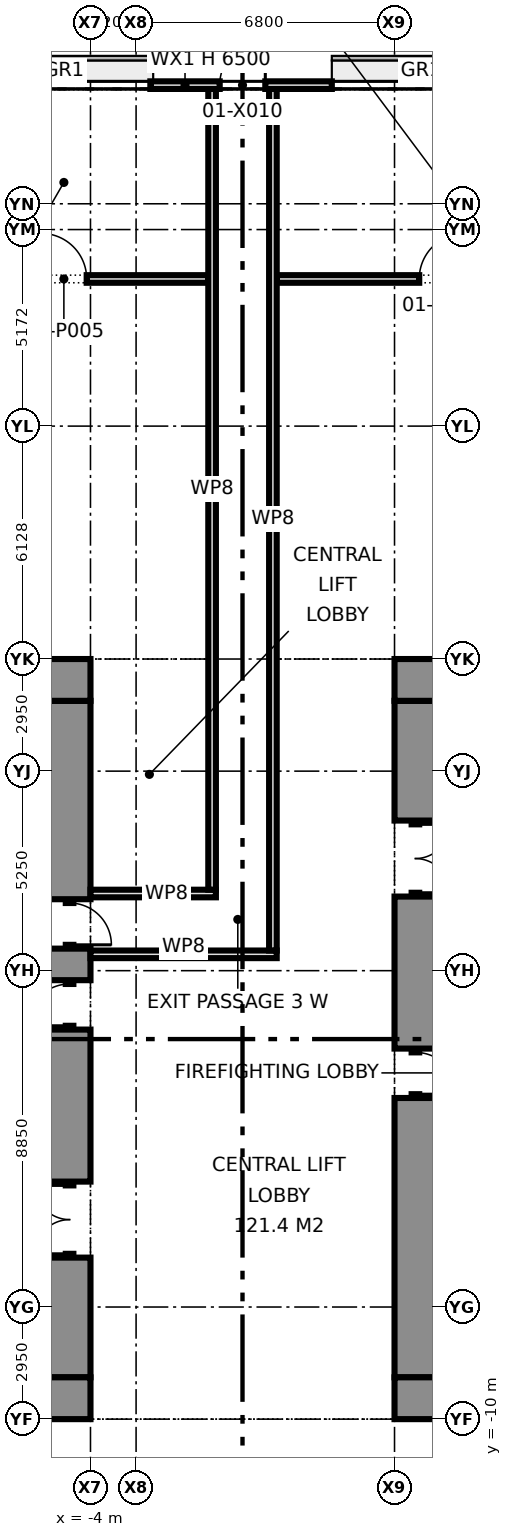
"""IFC4 building model, lengths in metres.
Left out: names, types, materials, properties, quantities, classifications, styles, units other than length and angle.
Written with IfcOpenShell. Run it as: python <this file> out.ifc"""

import sys

from ifc_helpers import new_model, si_unit, direction, frame, frame_2d, origin, place, context, subcontext, project, spatial, rectangle, extrude, element, fill, save


model = new_model("IFC4")
c1 = context("Model", 3, precision=1e-05, world=origin(), true_north=direction((0.0, 1.0)))
c2 = subcontext(c1, "Body", "Model", "MODEL_VIEW")
j1 = project(units=[si_unit("LENGTHUNIT", "METRE"), si_unit("PLANEANGLEUNIT", "RADIAN")], contexts=[c1])
p1 = place(None, origin())
s1 = spatial("IfcSite", under=j1, at=p1, CompositionType="ELEMENT")
p2 = place(p1, origin())
s2 = spatial("IfcBuilding", under=s1, at=p2, CompositionType="ELEMENT")
p3 = place(p2, origin())
s3 = spatial("IfcBuildingStorey", under=s2, at=p3, CompositionType="ELEMENT", Elevation=0.0)
p4 = place(p3, frame((2.35, 25.1, 0.0), z_axis=(0.0, 0.0, 1.0), x_axis=(-1.0, 0.0, 0.0)))
e1 = element("IfcWall", 1, at=p4, inside=s3, PredefinedType="STANDARD", context=c2, shape_type="SweptSolid", body=[
    extrude(rectangle(XDim=4.775, YDim=0.2, at=frame_2d((2.388, 0.0))), origin(), (0.0, 0.0, 1.0), 6.5),
])
p5 = place(p4, frame((1.75, 0.0, 0.0)))
e2 = element("IfcOpeningElement", 2, at=p5, cuts=e1, PredefinedType="OPENING", context=c2, shape_type="SweptSolid", body=[
    extrude(rectangle(XDim=1.2, YDim=2.1, at=frame_2d((0.6, 1.05))), frame((0.0, 0.11, 0.0), z_axis=(0.0, -1.0, 0.0), x_axis=(1.0, 0.0, 0.0)), (0.0, 0.0, 1.0), 0.22),
])
for number, where, z_axis, x_axis in (
    (3, (-15.0, -9.45, 0.0), (0.0, 0.0, 1.0), (1.0, 0.0, 0.0)),
    (4, (-15.0, 9.45, 0.0), (0.0, 0.0, 1.0), (1.0, 0.0, 0.0)),
):
    element("IfcWall", number, at=place(p3, frame(where, z_axis=z_axis, x_axis=x_axis)), inside=s3, PredefinedType="SHEAR", context=c2, shape_type="SweptSolid", body=[
        extrude(rectangle(XDim=11.0, YDim=1.1, at=frame_2d((5.5, 0.0))), origin(), (0.0, 0.0, 1.0), 6.275),
    ])
p6 = place(p3, frame((-4.55, -8.9, 0.0), z_axis=(0.0, 0.0, 1.0), x_axis=(0.0, 1.0, 0.0)))
e5 = element("IfcWall", 5, at=p6, inside=s3, PredefinedType="SHEAR", context=c2, shape_type="SweptSolid", body=[
    extrude(rectangle(XDim=3.15, YDim=1.1, at=frame_2d((1.575, 0.0))), origin(), (0.0, 0.0, 1.0), 6.275),
])
p7 = place(p3, frame((-4.55, -5.75, 0.0), z_axis=(0.0, 0.0, 1.0), x_axis=(0.0, 1.0, 0.0)))
e6 = element("IfcWall", 6, at=p7, inside=s3, PredefinedType="PARTITIONING", context=c2, shape_type="SweptSolid", body=[
    extrude(rectangle(XDim=2.0, YDim=0.2, at=frame_2d((1.0, 0.0))), origin(), (0.0, 0.0, 1.0), 2.4),
])
p8 = place(p7, frame((0.1, 0.0, 0.0)))
e7 = element("IfcOpeningElement", 7, at=p8, cuts=e6, PredefinedType="OPENING", context=c2, shape_type="SweptSolid", body=[
    extrude(rectangle(XDim=1.8, YDim=2.1, at=frame_2d((0.9, 1.05))), frame((0.0, 0.11, 0.0), z_axis=(0.0, -1.0, 0.0), x_axis=(1.0, 0.0, 0.0)), (0.0, 0.0, 1.0), 0.22),
])
p9 = place(p3, frame((-4.55, -3.75, 0.0), z_axis=(0.0, 0.0, 1.0), x_axis=(0.0, 1.0, 0.0)))
e8 = element("IfcWall", 8, at=p9, inside=s3, PredefinedType="SHEAR", context=c2, shape_type="SweptSolid", body=[
    extrude(rectangle(XDim=4.0, YDim=1.1, at=frame_2d((2.0, 0.0))), origin(), (0.0, 0.0, 1.0), 6.275),
])
p10 = place(p3, frame((-4.55, 0.25, 0.0), z_axis=(0.0, 0.0, 1.0), x_axis=(0.0, 1.0, 0.0)))
e9 = element("IfcWall", 9, at=p10, inside=s3, PredefinedType="PARTITIONING", context=c2, shape_type="SweptSolid", body=[
    extrude(rectangle(XDim=1.3, YDim=0.2, at=frame_2d((0.65, 0.0))), origin(), (0.0, 0.0, 1.0), 2.4),
])
p11 = place(p10, frame((0.1, 0.0, 0.0)))
e10 = element("IfcOpeningElement", 10, at=p11, cuts=e9, PredefinedType="OPENING", context=c2, shape_type="SweptSolid", body=[
    extrude(rectangle(XDim=1.1, YDim=2.1, at=frame_2d((0.55, 1.05))), frame((0.0, 0.11, 0.0), z_axis=(0.0, -1.0, 0.0), x_axis=(1.0, 0.0, 0.0)), (0.0, 0.0, 1.0), 0.22),
])
p12 = place(p3, frame((-4.55, 1.55, 0.0), z_axis=(0.0, 0.0, 1.0), x_axis=(0.0, 1.0, 0.0)))
e11 = element("IfcWall", 11, at=p12, inside=s3, PredefinedType="SHEAR", context=c2, shape_type="SweptSolid", body=[
    extrude(rectangle(XDim=0.83, YDim=1.1, at=frame_2d((0.415, 0.0))), origin(), (0.0, 0.0, 1.0), 6.275),
])
p13 = place(p3, frame((-4.55, 2.38, 0.0), z_axis=(0.0, 0.0, 1.0), x_axis=(0.0, 1.0, 0.0)))
e12 = element("IfcWall", 12, at=p13, inside=s3, PredefinedType="SHEAR", context=c2, shape_type="SweptSolid", body=[
    extrude(rectangle(XDim=1.3, YDim=0.2, at=frame_2d((0.65, 0.0))), origin(), (0.0, 0.0, 1.0), 2.4),
])
p14 = place(p13, frame((0.1, 0.0, 0.0)))
e13 = element("IfcOpeningElement", 13, at=p14, cuts=e12, PredefinedType="OPENING", context=c2, shape_type="SweptSolid", body=[
    extrude(rectangle(XDim=1.1, YDim=2.1, at=frame_2d((0.55, 1.05))), frame((0.0, 0.11, 0.0), z_axis=(0.0, -1.0, 0.0), x_axis=(1.0, 0.0, 0.0)), (0.0, 0.0, 1.0), 0.22),
])
p15 = place(p3, frame((-4.55, 3.68, 0.0), z_axis=(0.0, 0.0, 1.0), x_axis=(0.0, 1.0, 0.0)))
e14 = element("IfcWall", 14, at=p15, inside=s3, PredefinedType="SHEAR", context=c2, shape_type="SweptSolid", body=[
    extrude(rectangle(XDim=5.22, YDim=1.1, at=frame_2d((2.61, 0.0))), origin(), (0.0, 0.0, 1.0), 6.275),
])
for number, where, z_axis, x_axis in (
    (15, (15.0, 9.45, 0.0), (0.0, 0.0, 1.0), (-1.0, 0.0, 0.0)),
    (16, (15.0, -9.45, 0.0), (0.0, 0.0, 1.0), (-1.0, 0.0, 0.0)),
):
    element("IfcWall", number, at=place(p3, frame(where, z_axis=z_axis, x_axis=x_axis)), inside=s3, PredefinedType="SHEAR", context=c2, shape_type="SweptSolid", body=[
        extrude(rectangle(XDim=11.0, YDim=1.1, at=frame_2d((5.5, 0.0))), origin(), (0.0, 0.0, 1.0), 6.275),
    ])
p16 = place(p3, frame((4.55, 8.9, 0.0), z_axis=(0.0, 0.0, 1.0), x_axis=(0.0, -1.0, 0.0)))
e17 = element("IfcWall", 17, at=p16, inside=s3, PredefinedType="SHEAR", context=c2, shape_type="SweptSolid", body=[
    extrude(rectangle(XDim=3.15, YDim=1.1, at=frame_2d((1.575, 0.0))), origin(), (0.0, 0.0, 1.0), 6.275),
])
p17 = place(p3, frame((4.55, 5.75, 0.0), z_axis=(0.0, 0.0, 1.0), x_axis=(0.0, -1.0, 0.0)))
e18 = element("IfcWall", 18, at=p17, inside=s3, PredefinedType="PARTITIONING", context=c2, shape_type="SweptSolid", body=[
    extrude(rectangle(XDim=2.0, YDim=0.2, at=frame_2d((1.0, 0.0))), origin(), (0.0, 0.0, 1.0), 2.4),
])
p18 = place(p17, frame((0.1, 0.0, 0.0)))
e19 = element("IfcOpeningElement", 19, at=p18, cuts=e18, PredefinedType="OPENING", context=c2, shape_type="SweptSolid", body=[
    extrude(rectangle(XDim=1.8, YDim=2.1, at=frame_2d((0.9, 1.05))), frame((0.0, 0.11, 0.0), z_axis=(0.0, -1.0, 0.0), x_axis=(1.0, 0.0, 0.0)), (0.0, 0.0, 1.0), 0.22),
])
p19 = place(p3, frame((4.55, 3.75, 0.0), z_axis=(0.0, 0.0, 1.0), x_axis=(0.0, -1.0, 0.0)))
e20 = element("IfcWall", 20, at=p19, inside=s3, PredefinedType="SHEAR", context=c2, shape_type="SweptSolid", body=[
    extrude(rectangle(XDim=4.0, YDim=1.1, at=frame_2d((2.0, 0.0))), origin(), (0.0, 0.0, 1.0), 6.275),
])
p20 = place(p3, frame((4.55, -0.25, 0.0), z_axis=(0.0, 0.0, 1.0), x_axis=(0.0, -1.0, 0.0)))
e21 = element("IfcWall", 21, at=p20, inside=s3, PredefinedType="PARTITIONING", context=c2, shape_type="SweptSolid", body=[
    extrude(rectangle(XDim=1.3, YDim=0.2, at=frame_2d((0.65, 0.0))), origin(), (0.0, 0.0, 1.0), 2.4),
])
p21 = place(p20, frame((0.1, 0.0, 0.0)))
e22 = element("IfcOpeningElement", 22, at=p21, cuts=e21, PredefinedType="OPENING", context=c2, shape_type="SweptSolid", body=[
    extrude(rectangle(XDim=1.1, YDim=2.1, at=frame_2d((0.55, 1.05))), frame((0.0, 0.11, 0.0), z_axis=(0.0, -1.0, 0.0), x_axis=(1.0, 0.0, 0.0)), (0.0, 0.0, 1.0), 0.22),
])
p22 = place(p3, frame((4.55, -1.55, 0.0), z_axis=(0.0, 0.0, 1.0), x_axis=(0.0, -1.0, 0.0)))
e23 = element("IfcWall", 23, at=p22, inside=s3, PredefinedType="SHEAR", context=c2, shape_type="SweptSolid", body=[
    extrude(rectangle(XDim=7.35, YDim=1.1, at=frame_2d((3.675, 0.0))), origin(), (0.0, 0.0, 1.0), 6.275),
])
p23 = place(p3, frame((-8.7, 20.0, 0.0), z_axis=(0.0, 0.0, 1.0), x_axis=(1.0, 0.0, 0.0)))
e24 = element("IfcWall", 24, at=p23, inside=s3, PredefinedType="PARTITIONING", context=c2, shape_type="SweptSolid", body=[
    extrude(rectangle(XDim=7.8, YDim=0.2, at=frame_2d((3.9, 0.0))), origin(), (0.0, 0.0, 1.0), 6.275),
])
p24 = place(p23, frame((3.4, 0.0, 0.0)))
e25 = element("IfcOpeningElement", 25, at=p24, cuts=e24, PredefinedType="OPENING", context=c2, shape_type="SweptSolid", body=[
    extrude(rectangle(XDim=1.2, YDim=2.1, at=frame_2d((0.6, 1.05))), frame((0.0, 0.11, 0.0), z_axis=(0.0, -1.0, 0.0), x_axis=(1.0, 0.0, 0.0)), (0.0, 0.0, 1.0), 0.22),
])
p25 = place(p3, frame((0.9, 20.0, 0.0), z_axis=(0.0, 0.0, 1.0), x_axis=(1.0, 0.0, 0.0)))
e26 = element("IfcWall", 26, at=p25, inside=s3, PredefinedType="PARTITIONING", context=c2, shape_type="SweptSolid", body=[
    extrude(rectangle(XDim=8.9, YDim=0.2, at=frame_2d((4.45, 0.0))), origin(), (0.0, 0.0, 1.0), 6.275),
])
p26 = place(p25, frame((3.75, 0.0, 0.0)))
e27 = element("IfcOpeningElement", 27, at=p26, cuts=e26, PredefinedType="OPENING", context=c2, shape_type="SweptSolid", body=[
    extrude(rectangle(XDim=1.2, YDim=2.1, at=frame_2d((0.6, 1.05))), frame((0.0, 0.11, 0.0), z_axis=(0.0, -1.0, 0.0), x_axis=(1.0, 0.0, 0.0)), (0.0, 0.0, 1.0), 0.22),
])
p27 = place(p3, frame((-4.0, 2.23, 0.0), z_axis=(0.0, 0.0, 1.0), x_axis=(1.0, 0.0, 0.0)))
e28 = element("IfcWall", 28, at=p27, inside=s3, PredefinedType="PARTITIONING", context=c2, shape_type="SweptSolid", body=[
    extrude(rectangle(XDim=4.9, YDim=0.2, at=frame_2d((2.45, 0.0))), origin(), (0.0, 0.0, 1.0), 6.275),
])
p28 = place(p3, frame((-4.0, 3.83, 0.0), z_axis=(0.0, 0.0, 1.0), x_axis=(1.0, 0.0, 0.0)))
e29 = element("IfcWall", 29, at=p28, inside=s3, PredefinedType="PARTITIONING", context=c2, shape_type="SweptSolid", body=[
    extrude(rectangle(XDim=3.3, YDim=0.2, at=frame_2d((1.65, 0.0))), origin(), (0.0, 0.0, 1.0), 6.275),
])
p29 = place(p3, frame((0.8, 2.33, 0.0), z_axis=(0.0, 0.0, 1.0), x_axis=(0.0, 1.0, 0.0)))
e30 = element("IfcWall", 30, at=p29, inside=s3, PredefinedType="PARTITIONING", context=c2, shape_type="SweptSolid", body=[
    extrude(rectangle(XDim=22.7, YDim=0.2, at=frame_2d((11.35, 0.0))), origin(), (0.0, 0.0, 1.0), 6.275),
])
p30 = place(p3, frame((-0.8, 3.93, 0.0), z_axis=(0.0, 0.0, 1.0), x_axis=(0.0, 1.0, 0.0)))
e31 = element("IfcWall", 31, at=p30, inside=s3, PredefinedType="PARTITIONING", context=c2, shape_type="SweptSolid", body=[
    extrude(rectangle(XDim=21.1, YDim=0.2, at=frame_2d((10.55, 0.0))), origin(), (0.0, 0.0, 1.0), 6.275),
])
p31 = place(p5, frame((1.2, 0.0, 0.0), z_axis=(0.0, 0.0, 1.0), x_axis=(-1.0, 0.0, 0.0)))
e32 = element("IfcDoor", 32, at=p31, inside=s3, OperationType="SINGLE_SWING_RIGHT", PredefinedType="DOOR", context=c2, shape_type="SweptSolid", body=[
    extrude(rectangle(XDim=1.2, YDim=2.1, at=frame_2d((0.6, 1.05))), frame((0.0, 0.025, 0.0), z_axis=(0.0, -1.0, 0.0), x_axis=(1.0, 0.0, 0.0)), (0.0, 0.0, 1.0), 0.05),
])
fill(e2, e32)
p32 = place(p8, origin())
e33 = element("IfcDoor", 33, at=p32, inside=s3, OperationType="DOUBLE_DOOR_SINGLE_SWING", PredefinedType="DOOR", context=c2, shape_type="SweptSolid", body=[
    extrude(rectangle(XDim=1.8, YDim=2.1, at=frame_2d((0.9, 1.05))), frame((0.0, 0.025, 0.0), z_axis=(0.0, -1.0, 0.0), x_axis=(1.0, 0.0, 0.0)), (0.0, 0.0, 1.0), 0.05),
])
fill(e7, e33)
p33 = place(p11, origin())
e34 = element("IfcDoor", 34, at=p33, inside=s3, OperationType="SINGLE_SWING_LEFT", PredefinedType="DOOR", context=c2, shape_type="SweptSolid", body=[
    extrude(rectangle(XDim=1.1, YDim=2.1, at=frame_2d((0.55, 1.05))), frame((0.0, 0.025, 0.0), z_axis=(0.0, -1.0, 0.0), x_axis=(1.0, 0.0, 0.0)), (0.0, 0.0, 1.0), 0.05),
])
fill(e10, e34)
p34 = place(p14, frame((1.1, 0.0, 0.0), z_axis=(0.0, 0.0, 1.0), x_axis=(-1.0, 0.0, 0.0)))
e35 = element("IfcDoor", 35, at=p34, inside=s3, OperationType="SINGLE_SWING_RIGHT", PredefinedType="DOOR", context=c2, shape_type="SweptSolid", body=[
    extrude(rectangle(XDim=1.1, YDim=2.1, at=frame_2d((0.55, 1.05))), frame((0.0, 0.025, 0.0), z_axis=(0.0, -1.0, 0.0), x_axis=(1.0, 0.0, 0.0)), (0.0, 0.0, 1.0), 0.05),
])
fill(e13, e35)
p35 = place(p18, origin())
e36 = element("IfcDoor", 36, at=p35, inside=s3, OperationType="DOUBLE_DOOR_SINGLE_SWING", PredefinedType="DOOR", context=c2, shape_type="SweptSolid", body=[
    extrude(rectangle(XDim=1.8, YDim=2.1, at=frame_2d((0.9, 1.05))), frame((0.0, 0.025, 0.0), z_axis=(0.0, -1.0, 0.0), x_axis=(1.0, 0.0, 0.0)), (0.0, 0.0, 1.0), 0.05),
])
fill(e19, e36)
p36 = place(p21, origin())
e37 = element("IfcDoor", 37, at=p36, inside=s3, OperationType="SINGLE_SWING_RIGHT", PredefinedType="DOOR", context=c2, shape_type="SweptSolid", body=[
    extrude(rectangle(XDim=1.1, YDim=2.1, at=frame_2d((0.55, 1.05))), frame((0.0, 0.025, 0.0), z_axis=(0.0, -1.0, 0.0), x_axis=(1.0, 0.0, 0.0)), (0.0, 0.0, 1.0), 0.05),
])
fill(e22, e37)
p37 = place(p24, origin())
e38 = element("IfcDoor", 38, at=p37, inside=s3, OperationType="SINGLE_SWING_LEFT", PredefinedType="DOOR", context=c2, shape_type="SweptSolid", body=[
    extrude(rectangle(XDim=1.2, YDim=2.1, at=frame_2d((0.6, 1.05))), frame((0.0, 0.025, 0.0), z_axis=(0.0, -1.0, 0.0), x_axis=(1.0, 0.0, 0.0)), (0.0, 0.0, 1.0), 0.05),
])
fill(e25, e38)
p38 = place(p26, origin())
e39 = element("IfcDoor", 39, at=p38, inside=s3, OperationType="SINGLE_SWING_RIGHT", PredefinedType="DOOR", context=c2, shape_type="SweptSolid", body=[
    extrude(rectangle(XDim=1.2, YDim=2.1, at=frame_2d((0.6, 1.05))), frame((0.0, 0.025, 0.0), z_axis=(0.0, -1.0, 0.0), x_axis=(1.0, 0.0, 0.0)), (0.0, 0.0, 1.0), 0.05),
])
fill(e27, e39)
save(model, sys.argv[1])
